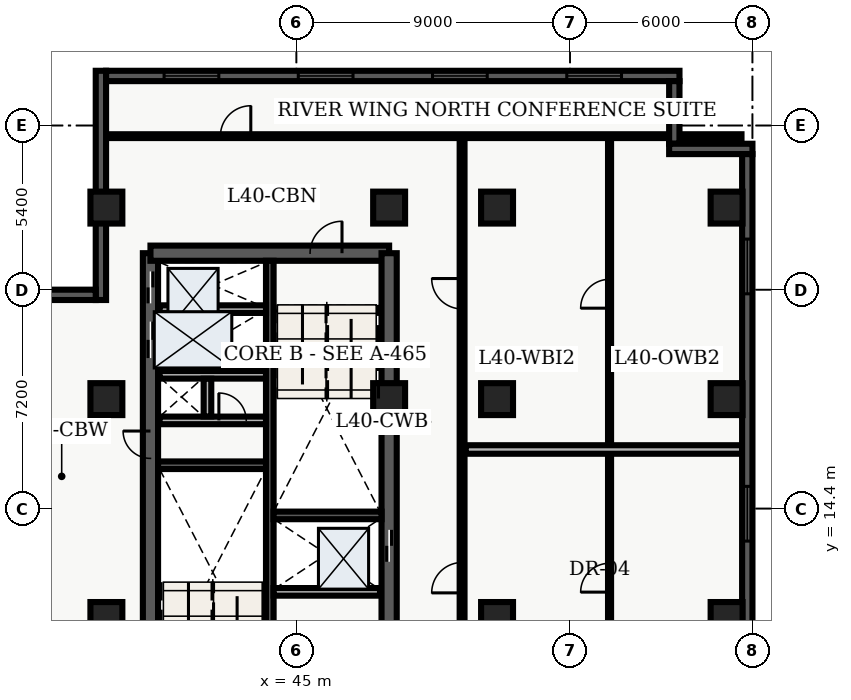
"""IFC4 building model, lengths in metres.
Left out: names, types, materials, properties, quantities, classifications, styles, units other than length and angle.
Written with IfcOpenShell. Run it as: python <this file> out.ifc"""

import sys

from ifc_helpers import new_model, entity, si_unit, converted_unit, direction, frame, origin_with_axes, origin_2d_with_axis, place, context, subcontext, project, spatial, polyline, rectangle, outline, extrude, element, fill, save


model = new_model("IFC4")
c1 = context("Model", 3, precision=1e-05, world=origin_with_axes(), true_north=direction((0.0, 1.0)))
c2 = subcontext(c1, "Body", "Model", "MODEL_VIEW")
j1 = project(units=[si_unit("LENGTHUNIT", "METRE"), converted_unit("PLANEANGLEUNIT", "DEGREE", entity("IfcPlaneAngleMeasure", 0.017), si_unit("PLANEANGLEUNIT", "RADIAN"), dimensions=[0, 0, 0, 0, 0, 0, 0])], contexts=[c1])
p1 = place(None, origin_with_axes())
s1 = spatial("IfcSite", under=j1, at=p1, CompositionType="ELEMENT")
p2 = place(p1, origin_with_axes())
s2 = spatial("IfcBuilding", under=s1, at=p2, CompositionType="ELEMENT")
p3 = place(p2, frame((0.0, 0.0, 164.1), z_axis=(0.0, 0.0, 1.0), x_axis=(1.0, 0.0, 0.0)))
s3 = spatial("IfcBuildingStorey", under=s2, at=p3, CompositionType="ELEMENT", Elevation=164.1)
p4 = place(p3, frame((40.2, 7.2, 0.0), z_axis=(0.0, 0.0, 1.0), x_axis=(0.0, 1.0, 0.0)))
e1 = element("IfcWall", 1, at=p4, inside=s3, PredefinedType="SHEAR", context=c2, shape_type="SweptSolid", body=[
    extrude(outline(polyline([(0.0, -0.25), (15.6, -0.25), (15.6, 0.25), (0.0, 0.25), (0.0, -0.25)])), origin_with_axes(), (0.0, 0.0, 1.0), 3.66),
])
p5 = place(p4, frame((14.475, 0.0, 0.0), z_axis=(0.0, 0.0, 1.0), x_axis=(1.0, 0.0, 0.0)))
e2 = element("IfcOpeningElement", 2, at=p5, cuts=e1, PredefinedType="OPENING", context=c2, shape_type="SweptSolid", body=[
    extrude(rectangle(XDim=1.05, YDim=0.52, at=origin_2d_with_axis()), origin_with_axes(), (0.0, 0.0, 1.0), 2.15),
])
p6 = place(p4, frame((12.75, 0.0, 0.0), z_axis=(0.0, 0.0, 1.0), x_axis=(1.0, 0.0, 0.0)))
e3 = element("IfcOpeningElement", 3, at=p6, cuts=e1, PredefinedType="OPENING", context=c2, shape_type="SweptSolid", body=[
    extrude(rectangle(XDim=1.2, YDim=0.52, at=origin_2d_with_axis()), origin_with_axes(), (0.0, 0.0, 1.0), 2.15),
])
p7 = place(p4, frame((9.3, 0.0, 0.0), z_axis=(0.0, 0.0, 1.0), x_axis=(1.0, 0.0, 0.0)))
e4 = element("IfcOpeningElement", 4, at=p7, cuts=e1, PredefinedType="OPENING", context=c2, shape_type="SweptSolid", body=[
    extrude(rectangle(XDim=0.9, YDim=0.52, at=origin_2d_with_axis()), origin_with_axes(), (0.0, 0.0, 1.0), 2.15),
])
p8 = place(p3, frame((40.2, 22.8, 0.0), z_axis=(0.0, 0.0, 1.0), x_axis=(1.0, 0.0, 0.0)))
e5 = element("IfcWall", 5, at=p8, inside=s3, PredefinedType="SHEAR", context=c2, shape_type="SweptSolid", body=[
    extrude(outline(polyline([(0.0, -0.25), (7.85, -0.25), (7.85, 0.25), (0.0, 0.25), (0.0, -0.25)])), origin_with_axes(), (0.0, 0.0, 1.0), 3.66),
])
p9 = place(p8, frame((5.775, 0.0, 0.0), z_axis=(0.0, 0.0, 1.0), x_axis=(1.0, 0.0, 0.0)))
e6 = element("IfcOpeningElement", 6, at=p9, cuts=e5, PredefinedType="OPENING", context=c2, shape_type="SweptSolid", body=[
    extrude(rectangle(XDim=1.05, YDim=0.52, at=origin_2d_with_axis()), origin_with_axes(), (0.0, 0.0, 1.0), 2.15),
])
p10 = place(p3, frame((48.05, 7.2, 0.0), z_axis=(0.0, 0.0, 1.0), x_axis=(0.0, 1.0, 0.0)))
e7 = element("IfcWall", 7, at=p10, inside=s3, PredefinedType="SHEAR", context=c2, shape_type="SweptSolid", body=[
    extrude(outline(polyline([(0.0, -0.25), (15.6, -0.25), (15.6, 0.25), (0.0, 0.25), (0.0, -0.25)])), origin_with_axes(), (0.0, 0.0, 1.0), 3.66),
])
p11 = place(p10, frame((5.975, 0.0, 0.0), z_axis=(0.0, 0.0, 1.0), x_axis=(1.0, 0.0, 0.0)))
e8 = element("IfcOpeningElement", 8, at=p11, cuts=e7, PredefinedType="OPENING", context=c2, shape_type="SweptSolid", body=[
    extrude(rectangle(XDim=1.05, YDim=0.52, at=origin_2d_with_axis()), origin_with_axes(), (0.0, 0.0, 1.0), 2.15),
])
p12 = place(p10, frame((2.725, 0.0, 0.0), z_axis=(0.0, 0.0, 1.0), x_axis=(1.0, 0.0, 0.0)))
e9 = element("IfcOpeningElement", 9, at=p12, cuts=e7, PredefinedType="OPENING", context=c2, shape_type="SweptSolid", body=[
    extrude(rectangle(XDim=0.95, YDim=0.52, at=origin_2d_with_axis()), origin_with_axes(), (0.0, 0.0, 1.0), 2.15),
])
p13 = place(p3, frame((44.125, 7.45, 0.0), z_axis=(0.0, 0.0, 1.0), x_axis=(0.0, 1.0, 0.0)))
e10 = element("IfcWall", 10, at=p13, inside=s3, PredefinedType="SHEAR", context=c2, shape_type="SweptSolid", body=[
    extrude(outline(polyline([(0.0, -0.125), (15.1, -0.125), (15.1, 0.125), (0.0, 0.125), (0.0, -0.125)])), origin_with_axes(), (0.0, 0.0, 1.0), 3.66),
])
for number, where, z_axis, x_axis in (
    (11, (40.45, 15.825, 0.0), (0.0, 0.0, 1.0), (1.0, 0.0, 0.0)),
    (12, (44.25, 14.175, 0.0), (0.0, 0.0, 1.0), (1.0, 0.0, 0.0)),
):
    element("IfcWall", number, at=place(p3, frame(where, z_axis=z_axis, x_axis=x_axis)), inside=s3, PredefinedType="SHEAR", context=c2, shape_type="SweptSolid", body=[
        extrude(outline(polyline([(0.0, -0.125), (3.55, -0.125), (3.55, 0.125), (0.0, 0.125), (0.0, -0.125)])), origin_with_axes(), (0.0, 0.0, 1.0), 3.66),
    ])
p14 = place(p3, frame((40.5, 17.3, 0.0), z_axis=(0.0, 0.0, 1.0), x_axis=(1.0, 0.0, 0.0)))
e13 = element("IfcWall", 13, at=p14, inside=s3, PredefinedType="SOLIDWALL", context=c2, shape_type="SweptSolid", body=[
    extrude(outline(polyline([(0.0, -0.125), (3.5, -0.125), (3.5, 0.125), (0.0, 0.125), (0.0, -0.125)])), origin_with_axes(), (0.0, 0.0, 1.0), 2.7),
])
p15 = place(p14, frame((2.4, 0.0, 0.0), z_axis=(0.0, 0.0, 1.0), x_axis=(1.0, 0.0, 0.0)))
e14 = element("IfcOpeningElement", 14, at=p15, cuts=e13, PredefinedType="OPENING", context=c2, shape_type="SweptSolid", body=[
    extrude(rectangle(XDim=0.9, YDim=0.27, at=origin_2d_with_axis()), origin_with_axes(), (0.0, 0.0, 1.0), 2.15),
])
p16 = place(p3, frame((40.5, 18.8, 0.0), z_axis=(0.0, 0.0, 1.0), x_axis=(1.0, 0.0, 0.0)))
e15 = element("IfcWall", 15, at=p16, inside=s3, PredefinedType="SOLIDWALL", context=c2, shape_type="SweptSolid", body=[
    extrude(outline(polyline([(0.0, -0.125), (3.5, -0.125), (3.5, 0.125), (0.0, 0.125), (0.0, -0.125)])), origin_with_axes(), (0.0, 0.0, 1.0), 2.7),
])
p17 = place(p3, frame((42.075, 17.43, 0.0), z_axis=(0.0, 0.0, 1.0), x_axis=(0.0, 1.0, 0.0)))
e16 = element("IfcWall", 16, at=p17, inside=s3, PredefinedType="SOLIDWALL", context=c2, shape_type="SweptSolid", body=[
    extrude(outline(polyline([(0.0, -0.125), (1.24, -0.125), (1.24, 0.125), (0.0, 0.125), (0.0, -0.125)])), origin_with_axes(), (0.0, 0.0, 1.0), 2.7),
])
for number, where, z_axis, x_axis in (
    (17, (38.75, 10.8, 0.0), (0.0, 0.0, 1.0), (1.0, 0.0, 0.0)),
    (18, (38.75, 18.0, 0.0), (0.0, 0.0, 1.0), (1.0, 0.0, 0.0)),
    (19, (38.75, 24.3, 0.0), (0.0, 0.0, 1.0), (1.0, 0.0, 0.0)),
    (20, (48.05, 18.0, 0.0), (0.0, 0.0, 1.0), (1.0, 0.0, 0.0)),
    (21, (48.05, 24.3, 0.0), (0.0, 0.0, 1.0), (1.0, 0.0, 0.0)),
    (22, (51.6, 10.8, 0.0), (0.0, 0.0, 1.0), (1.0, 0.0, 0.0)),
    (23, (51.6, 18.0, 0.0), (0.0, 0.0, 1.0), (1.0, 0.0, 0.0)),
    (24, (51.6, 24.3, 0.0), (0.0, 0.0, 1.0), (1.0, 0.0, 0.0)),
    (25, (59.15, 10.8, 0.0), (0.0, 0.0, 1.0), (1.0, 0.0, 0.0)),
    (26, (59.15, 18.0, 0.0), (0.0, 0.0, 1.0), (1.0, 0.0, 0.0)),
    (27, (59.15, 24.3, 0.0), (0.0, 0.0, 1.0), (1.0, 0.0, 0.0)),
):
    element("IfcColumn", number, at=place(p3, frame(where, z_axis=z_axis, x_axis=x_axis)), inside=s3, PredefinedType="COLUMN", context=c2, shape_type="SweptSolid", body=[
        extrude(rectangle(XDim=1.05, YDim=1.05, at=origin_2d_with_axis()), origin_with_axes(), (0.0, 0.0, 1.0), 3.9),
    ])
for number, where, z_axis, x_axis in (
    (28, (40.5, 20.96, 0.0), (0.0, 0.0, 1.0), (1.0, 0.0, 0.0)),
    (29, (44.25, 11.66, 0.0), (0.0, 0.0, 1.0), (1.0, 0.0, 0.0)),
):
    element("IfcWall", number, at=place(p3, frame(where, z_axis=z_axis, x_axis=x_axis)), inside=s3, PredefinedType="SOLIDWALL", context=c2, shape_type="SweptSolid", body=[
        extrude(outline(polyline([(0.0, -0.125), (3.5, -0.125), (3.5, 0.125), (0.0, 0.125), (0.0, -0.125)])), origin_with_axes(), (0.0, 0.0, 1.0), 2.7),
    ])
p18 = place(p3, frame((50.45, 7.85, 0.0), z_axis=(0.0, 0.0, 1.0), x_axis=(0.0, 1.0, 0.0)))
e30 = element("IfcWall", 30, at=p18, inside=s3, PredefinedType="PARTITIONING", context=c2, shape_type="SweptSolid", body=[
    extrude(outline(polyline([(0.0, -0.08), (18.8, -0.08), (18.8, 0.08), (0.0, 0.08), (0.0, -0.08)])), origin_with_axes(), (0.0, 0.0, 1.0), 2.7),
])
p19 = place(p18, frame((4.277, 0.0, 0.0), z_axis=(0.0, 0.0, 1.0), x_axis=(1.0, 0.0, 0.0)))
e31 = element("IfcOpeningElement", 31, at=p19, cuts=e30, PredefinedType="OPENING", context=c2, shape_type="SweptSolid", body=[
    extrude(rectangle(XDim=1.0, YDim=0.18, at=origin_2d_with_axis()), origin_with_axes(), (0.0, 0.0, 1.0), 2.15),
])
p20 = place(p18, frame((13.617, 0.0, 0.0), z_axis=(0.0, 0.0, 1.0), x_axis=(1.0, 0.0, 0.0)))
e32 = element("IfcOpeningElement", 32, at=p20, cuts=e30, PredefinedType="OPENING", context=c2, shape_type="SweptSolid", body=[
    extrude(rectangle(XDim=1.0, YDim=0.18, at=origin_2d_with_axis()), origin_with_axes(), (0.0, 0.0, 1.0), 2.15),
])
p21 = place(p3, frame((38.735, 26.65, 0.0), z_axis=(0.0, 0.0, 1.0), x_axis=(1.0, 0.0, 0.0)))
e33 = element("IfcWall", 33, at=p21, inside=s3, PredefinedType="PARTITIONING", context=c2, shape_type="SweptSolid", body=[
    extrude(outline(polyline([(0.0, -0.062), (20.905, -0.062), (20.905, 0.062), (0.0, 0.062), (0.0, -0.062)])), origin_with_axes(), (0.0, 0.0, 1.0), 2.7),
])
p22 = place(p21, frame((4.265, 0.0, 0.0), z_axis=(0.0, 0.0, 1.0), x_axis=(1.0, 0.0, 0.0)))
e34 = element("IfcOpeningElement", 34, at=p22, cuts=e33, PredefinedType="OPENING", context=c2, shape_type="SweptSolid", body=[
    extrude(rectangle(XDim=1.0, YDim=0.145, at=origin_2d_with_axis()), origin_with_axes(), (0.0, 0.0, 1.0), 2.15),
])
p23 = place(p3, frame((55.3, 7.98, 0.0), z_axis=(0.0, 0.0, 1.0), x_axis=(0.0, 1.0, 0.0)))
e35 = element("IfcWall", 35, at=p23, inside=s3, PredefinedType="PARTITIONING", context=c2, shape_type="SweptSolid", body=[
    extrude(outline(polyline([(0.0, -0.05), (18.54, -0.05), (18.54, 0.05), (0.0, 0.05), (0.0, -0.05)])), origin_with_axes(), (0.0, 0.0, 1.0), 2.7),
])
p24 = place(p23, frame((4.146, 0.0, 0.0), z_axis=(0.0, 0.0, 1.0), x_axis=(1.0, 0.0, 0.0)))
e36 = element("IfcOpeningElement", 36, at=p24, cuts=e35, PredefinedType="OPENING", context=c2, shape_type="SweptSolid", body=[
    extrude(rectangle(XDim=0.95, YDim=0.12, at=origin_2d_with_axis()), origin_with_axes(), (0.0, 0.0, 1.0), 2.15),
])
p25 = place(p23, frame((13.486, 0.0, 0.0), z_axis=(0.0, 0.0, 1.0), x_axis=(1.0, 0.0, 0.0)))
e37 = element("IfcOpeningElement", 37, at=p25, cuts=e35, PredefinedType="OPENING", context=c2, shape_type="SweptSolid", body=[
    extrude(rectangle(XDim=0.95, YDim=0.12, at=origin_2d_with_axis()), origin_with_axes(), (0.0, 0.0, 1.0), 2.15),
])
p26 = place(p3, frame((50.57, 16.343, 0.0), z_axis=(0.0, 0.0, 1.0), x_axis=(1.0, 0.0, 0.0)))
e38 = element("IfcWall", 38, at=p26, inside=s3, PredefinedType="PARTITIONING", context=c2, shape_type="SweptSolid", body=[
    extrude(outline(polyline([(0.0, -0.14), (9.095, -0.14), (9.095, 0.14), (0.0, 0.14), (0.0, -0.14)])), origin_with_axes(), (0.0, 0.0, 1.0), 2.7),
])
p27 = place(p3, frame((38.57, 21.26, 0.0), z_axis=(0.0, 0.0, 1.0), x_axis=(0.0, 1.0, 0.0)))
e39 = element("IfcWall", 39, at=p27, inside=s3, PredefinedType="SOLIDWALL", context=c2, shape_type="SweptSolid", body=[
    extrude(outline(polyline([(0.0, -0.17), (7.54, -0.17), (7.54, 0.17), (0.0, 0.17), (0.0, -0.17)])), origin_with_axes(), (0.0, 0.0, 1.0), 3.66),
])
p28 = place(p3, frame((38.74, 28.63, 0.0), z_axis=(0.0, 0.0, 1.0), x_axis=(1.0, 0.0, 0.0)))
e40 = element("IfcWall", 40, at=p28, inside=s3, PredefinedType="SOLIDWALL", context=c2, shape_type="SweptSolid", body=[
    extrude(outline(polyline([(0.0, -0.17), (18.86, -0.17), (18.86, 0.17), (0.0, 0.17), (0.0, -0.17)])), origin_with_axes(), (0.0, 0.0, 1.0), 3.66),
])
p29 = place(p28, frame((2.808, 0.0, 0.45), z_axis=(0.0, 0.0, 1.0), x_axis=(1.0, 0.0, 0.0)))
e41 = element("IfcOpeningElement", 41, at=p29, cuts=e40, PredefinedType="OPENING", context=c2, shape_type="SweptSolid", body=[
    extrude(rectangle(XDim=1.8, YDim=0.36, at=origin_2d_with_axis()), origin_with_axes(), (0.0, 0.0, 1.0), 2.1),
])
p30 = place(p28, frame((7.222, 0.0, 0.45), z_axis=(0.0, 0.0, 1.0), x_axis=(1.0, 0.0, 0.0)))
e42 = element("IfcOpeningElement", 42, at=p30, cuts=e40, PredefinedType="OPENING", context=c2, shape_type="SweptSolid", body=[
    extrude(rectangle(XDim=1.8, YDim=0.36, at=origin_2d_with_axis()), origin_with_axes(), (0.0, 0.0, 1.0), 2.1),
])
p31 = place(p28, frame((11.637, 0.0, 0.45), z_axis=(0.0, 0.0, 1.0), x_axis=(1.0, 0.0, 0.0)))
e43 = element("IfcOpeningElement", 43, at=p31, cuts=e40, PredefinedType="OPENING", context=c2, shape_type="SweptSolid", body=[
    extrude(rectangle(XDim=1.8, YDim=0.36, at=origin_2d_with_axis()), origin_with_axes(), (0.0, 0.0, 1.0), 2.1),
])
p32 = place(p28, frame((16.053, 0.0, 0.45), z_axis=(0.0, 0.0, 1.0), x_axis=(1.0, 0.0, 0.0)))
e44 = element("IfcOpeningElement", 44, at=p32, cuts=e40, PredefinedType="OPENING", context=c2, shape_type="SweptSolid", body=[
    extrude(rectangle(XDim=1.8, YDim=0.36, at=origin_2d_with_axis()), origin_with_axes(), (0.0, 0.0, 1.0), 2.1),
])
p33 = place(p3, frame((57.43, 28.46, 0.0), z_axis=(0.0, 0.0, 1.0), x_axis=(0.0, -1.0, 0.0)))
e45 = element("IfcWall", 45, at=p33, inside=s3, PredefinedType="SOLIDWALL", context=c2, shape_type="SweptSolid", body=[
    extrude(outline(polyline([(0.0, -0.17), (2.06, -0.17), (2.06, 0.17), (0.0, 0.17), (0.0, -0.17)])), origin_with_axes(), (0.0, 0.0, 1.0), 3.66),
])
p34 = place(p3, frame((57.26, 26.23, 0.0), z_axis=(0.0, 0.0, 1.0), x_axis=(1.0, 0.0, 0.0)))
e46 = element("IfcWall", 46, at=p34, inside=s3, PredefinedType="SOLIDWALL", context=c2, shape_type="SweptSolid", body=[
    extrude(outline(polyline([(0.0, -0.17), (2.74, -0.17), (2.74, 0.17), (0.0, 0.17), (0.0, -0.17)])), origin_with_axes(), (0.0, 0.0, 1.0), 3.66),
])
p35 = place(p3, frame((59.83, 26.06, 0.0), z_axis=(0.0, 0.0, 1.0), x_axis=(0.0, -1.0, 0.0)))
e47 = element("IfcWall", 47, at=p35, inside=s3, PredefinedType="SOLIDWALL", context=c2, shape_type="SweptSolid", body=[
    extrude(outline(polyline([(0.0, -0.17), (23.66, -0.17), (23.66, 0.17), (0.0, 0.17), (0.0, -0.17)])), origin_with_axes(), (0.0, 0.0, 1.0), 3.66),
])
p36 = place(p35, frame((3.696, 0.0, 0.45), z_axis=(0.0, 0.0, 1.0), x_axis=(1.0, 0.0, 0.0)))
e48 = element("IfcOpeningElement", 48, at=p36, cuts=e47, PredefinedType="OPENING", context=c2, shape_type="SweptSolid", body=[
    extrude(rectangle(XDim=1.8, YDim=0.36, at=origin_2d_with_axis()), origin_with_axes(), (0.0, 0.0, 1.0), 2.1),
])
p37 = place(p35, frame((11.83, 0.0, 0.45), z_axis=(0.0, 0.0, 1.0), x_axis=(1.0, 0.0, 0.0)))
e49 = element("IfcOpeningElement", 49, at=p37, cuts=e47, PredefinedType="OPENING", context=c2, shape_type="SweptSolid", body=[
    extrude(rectangle(XDim=1.8, YDim=0.36, at=origin_2d_with_axis()), origin_with_axes(), (0.0, 0.0, 1.0), 2.1),
])
p38 = place(p35, frame((20.364, 0.0, 0.45), z_axis=(0.0, 0.0, 1.0), x_axis=(1.0, 0.0, 0.0)))
e50 = element("IfcOpeningElement", 50, at=p38, cuts=e47, PredefinedType="OPENING", context=c2, shape_type="SweptSolid", body=[
    extrude(rectangle(XDim=1.8, YDim=0.36, at=origin_2d_with_axis()), origin_with_axes(), (0.0, 0.0, 1.0), 2.1),
])
p39 = place(p3, frame((23.479, 21.43, 0.0), z_axis=(0.0, 0.0, 1.0), x_axis=(1.0, 0.0, 0.0)))
e51 = element("IfcWall", 51, at=p39, inside=s3, PredefinedType="SOLIDWALL", context=c2, shape_type="SweptSolid", body=[
    extrude(outline(polyline([(0.0, -0.17), (14.921, -0.17), (14.921, 0.17), (0.0, 0.17), (0.0, -0.17)])), origin_with_axes(), (0.0, 0.0, 1.0), 3.66),
])
p40 = place(p39, frame((2.437, 0.0, 0.45), z_axis=(0.0, 0.0, 1.0), x_axis=(1.0, 0.0, 0.0)))
e52 = element("IfcOpeningElement", 52, at=p40, cuts=e51, PredefinedType="OPENING", context=c2, shape_type="SweptSolid", body=[
    extrude(rectangle(XDim=1.8, YDim=0.36, at=origin_2d_with_axis()), origin_with_axes(), (0.0, 0.0, 1.0), 2.1),
])
p41 = place(p39, frame((6.61, 0.0, 0.45), z_axis=(0.0, 0.0, 1.0), x_axis=(1.0, 0.0, 0.0)))
e53 = element("IfcOpeningElement", 53, at=p41, cuts=e51, PredefinedType="OPENING", context=c2, shape_type="SweptSolid", body=[
    extrude(rectangle(XDim=1.8, YDim=0.36, at=origin_2d_with_axis()), origin_with_axes(), (0.0, 0.0, 1.0), 2.1),
])
p42 = place(p39, frame((11.184, 0.0, 0.45), z_axis=(0.0, 0.0, 1.0), x_axis=(1.0, 0.0, 0.0)))
e54 = element("IfcOpeningElement", 54, at=p42, cuts=e51, PredefinedType="OPENING", context=c2, shape_type="SweptSolid", body=[
    extrude(rectangle(XDim=1.8, YDim=0.36, at=origin_2d_with_axis()), origin_with_axes(), (0.0, 0.0, 1.0), 2.1),
])
p43 = place(p10, frame((5.975, 0.0, 0.0), z_axis=(0.0, 0.0, 1.0), x_axis=(1.0, 0.0, 0.0)))
e55 = element("IfcDoor", 55, at=p43, inside=s3, OperationType="SLIDING_TO_LEFT", PredefinedType="DOOR", context=c2, shape_type="SweptSolid", body=[
    extrude(rectangle(XDim=1.05, YDim=0.09, at=origin_2d_with_axis()), origin_with_axes(), (0.0, 0.0, 1.0), 2.15),
])
fill(e8, e55)
p44 = place(p4, frame((14.475, 0.0, 0.0), z_axis=(0.0, 0.0, 1.0), x_axis=(1.0, 0.0, 0.0)))
e56 = element("IfcDoor", 56, at=p44, inside=s3, OperationType="SLIDING_TO_RIGHT", PredefinedType="DOOR", context=c2, shape_type="SweptSolid", body=[
    extrude(rectangle(XDim=1.05, YDim=0.09, at=origin_2d_with_axis()), origin_with_axes(), (0.0, 0.0, 1.0), 2.15),
])
fill(e2, e56)
p45 = place(p4, frame((12.75, 0.0, 0.0), z_axis=(0.0, 0.0, 1.0), x_axis=(1.0, 0.0, 0.0)))
e57 = element("IfcDoor", 57, at=p45, inside=s3, OperationType="DOUBLE_DOOR_SLIDING", PredefinedType="DOOR", context=c2, shape_type="SweptSolid", body=[
    extrude(rectangle(XDim=1.2, YDim=0.09, at=origin_2d_with_axis()), origin_with_axes(), (0.0, 0.0, 1.0), 2.15),
])
fill(e3, e57)
p46 = place(p4, frame((9.3, 0.0, 0.0), z_axis=(0.0, 0.0, 1.0), x_axis=(1.0, 0.0, 0.0)))
e58 = element("IfcDoor", 58, at=p46, inside=s3, OperationType="SINGLE_SWING_RIGHT", PredefinedType="DOOR", context=c2, shape_type="SweptSolid", body=[
    extrude(rectangle(XDim=0.9, YDim=0.09, at=origin_2d_with_axis()), origin_with_axes(), (0.0, 0.0, 1.0), 2.15),
])
fill(e4, e58)
p47 = place(p14, frame((2.4, 0.0, 0.0), z_axis=(0.0, 0.0, 1.0), x_axis=(1.0, 0.0, 0.0)))
e59 = element("IfcDoor", 59, at=p47, inside=s3, OperationType="SINGLE_SWING_LEFT", PredefinedType="DOOR", context=c2, shape_type="SweptSolid", body=[
    extrude(rectangle(XDim=0.9, YDim=0.09, at=origin_2d_with_axis()), origin_with_axes(), (0.0, 0.0, 1.0), 2.15),
])
fill(e14, e59)
p48 = place(p8, frame((5.775, 0.0, 0.0), z_axis=(0.0, 0.0, 1.0), x_axis=(1.0, 0.0, 0.0)))
e60 = element("IfcDoor", 60, at=p48, inside=s3, OperationType="SINGLE_SWING_RIGHT", PredefinedType="DOOR", context=c2, shape_type="SweptSolid", body=[
    extrude(rectangle(XDim=1.05, YDim=0.09, at=origin_2d_with_axis()), origin_with_axes(), (0.0, 0.0, 1.0), 2.15),
])
fill(e6, e60)
p49 = place(p21, frame((4.265, 0.0, 0.0), z_axis=(0.0, 0.0, 1.0), x_axis=(1.0, 0.0, 0.0)))
e61 = element("IfcDoor", 61, at=p49, inside=s3, OperationType="SINGLE_SWING_RIGHT", PredefinedType="DOOR", context=c2, shape_type="SweptSolid", body=[
    extrude(rectangle(XDim=1.0, YDim=0.075, at=origin_2d_with_axis()), origin_with_axes(), (0.0, 0.0, 1.0), 2.15),
])
fill(e34, e61)
p50 = place(p23, frame((4.146, 0.0, 0.0), z_axis=(0.0, 0.0, 1.0), x_axis=(1.0, 0.0, 0.0)))
e62 = element("IfcDoor", 62, at=p50, inside=s3, OperationType="SINGLE_SWING_LEFT", PredefinedType="DOOR", context=c2, shape_type="SweptSolid", body=[
    extrude(rectangle(XDim=0.95, YDim=0.06, at=origin_2d_with_axis()), origin_with_axes(), (0.0, 0.0, 1.0), 2.15),
])
fill(e36, e62)
p51 = place(p18, frame((4.277, 0.0, 0.0), z_axis=(0.0, 0.0, 1.0), x_axis=(1.0, 0.0, 0.0)))
e63 = element("IfcDoor", 63, at=p51, inside=s3, OperationType="SINGLE_SWING_LEFT", PredefinedType="DOOR", context=c2, shape_type="SweptSolid", body=[
    extrude(rectangle(XDim=1.0, YDim=0.09, at=origin_2d_with_axis()), origin_with_axes(), (0.0, 0.0, 1.0), 2.15),
])
fill(e31, e63)
p52 = place(p23, frame((13.486, 0.0, 0.0), z_axis=(0.0, 0.0, 1.0), x_axis=(1.0, 0.0, 0.0)))
e64 = element("IfcDoor", 64, at=p52, inside=s3, OperationType="SINGLE_SWING_LEFT", PredefinedType="DOOR", context=c2, shape_type="SweptSolid", body=[
    extrude(rectangle(XDim=0.95, YDim=0.06, at=origin_2d_with_axis()), origin_with_axes(), (0.0, 0.0, 1.0), 2.15),
])
fill(e37, e64)
p53 = place(p18, frame((13.617, 0.0, 0.0), z_axis=(0.0, 0.0, 1.0), x_axis=(1.0, 0.0, 0.0)))
e65 = element("IfcDoor", 65, at=p53, inside=s3, OperationType="SINGLE_SWING_RIGHT", PredefinedType="DOOR", context=c2, shape_type="SweptSolid", body=[
    extrude(rectangle(XDim=1.0, YDim=0.09, at=origin_2d_with_axis()), origin_with_axes(), (0.0, 0.0, 1.0), 2.15),
])
fill(e32, e65)
p54 = place(p28, frame((2.808, 0.0, 0.45), z_axis=(0.0, 0.0, 1.0), x_axis=(1.0, 0.0, 0.0)))
e66 = element("IfcWindow", 66, at=p54, inside=s3, PredefinedType="WINDOW", context=c2, shape_type="SweptSolid", body=[
    extrude(rectangle(XDim=1.8, YDim=0.09, at=origin_2d_with_axis()), origin_with_axes(), (0.0, 0.0, 1.0), 2.1),
])
fill(e41, e66)
p55 = place(p28, frame((7.222, 0.0, 0.45), z_axis=(0.0, 0.0, 1.0), x_axis=(1.0, 0.0, 0.0)))
e67 = element("IfcWindow", 67, at=p55, inside=s3, PredefinedType="WINDOW", context=c2, shape_type="SweptSolid", body=[
    extrude(rectangle(XDim=1.8, YDim=0.09, at=origin_2d_with_axis()), origin_with_axes(), (0.0, 0.0, 1.0), 2.1),
])
fill(e42, e67)
p56 = place(p28, frame((11.637, 0.0, 0.45), z_axis=(0.0, 0.0, 1.0), x_axis=(1.0, 0.0, 0.0)))
e68 = element("IfcWindow", 68, at=p56, inside=s3, PredefinedType="WINDOW", context=c2, shape_type="SweptSolid", body=[
    extrude(rectangle(XDim=1.8, YDim=0.09, at=origin_2d_with_axis()), origin_with_axes(), (0.0, 0.0, 1.0), 2.1),
])
fill(e43, e68)
p57 = place(p28, frame((16.053, 0.0, 0.45), z_axis=(0.0, 0.0, 1.0), x_axis=(1.0, 0.0, 0.0)))
e69 = element("IfcWindow", 69, at=p57, inside=s3, PredefinedType="WINDOW", context=c2, shape_type="SweptSolid", body=[
    extrude(rectangle(XDim=1.8, YDim=0.09, at=origin_2d_with_axis()), origin_with_axes(), (0.0, 0.0, 1.0), 2.1),
])
fill(e44, e69)
p58 = place(p35, frame((3.696, 0.0, 0.45), z_axis=(0.0, 0.0, 1.0), x_axis=(1.0, 0.0, 0.0)))
e70 = element("IfcWindow", 70, at=p58, inside=s3, PredefinedType="WINDOW", context=c2, shape_type="SweptSolid", body=[
    extrude(rectangle(XDim=1.8, YDim=0.09, at=origin_2d_with_axis()), origin_with_axes(), (0.0, 0.0, 1.0), 2.1),
])
fill(e48, e70)
p59 = place(p35, frame((11.83, 0.0, 0.45), z_axis=(0.0, 0.0, 1.0), x_axis=(1.0, 0.0, 0.0)))
e71 = element("IfcWindow", 71, at=p59, inside=s3, PredefinedType="WINDOW", context=c2, shape_type="SweptSolid", body=[
    extrude(rectangle(XDim=1.8, YDim=0.09, at=origin_2d_with_axis()), origin_with_axes(), (0.0, 0.0, 1.0), 2.1),
])
fill(e49, e71)
save(model, sys.argv[1])
